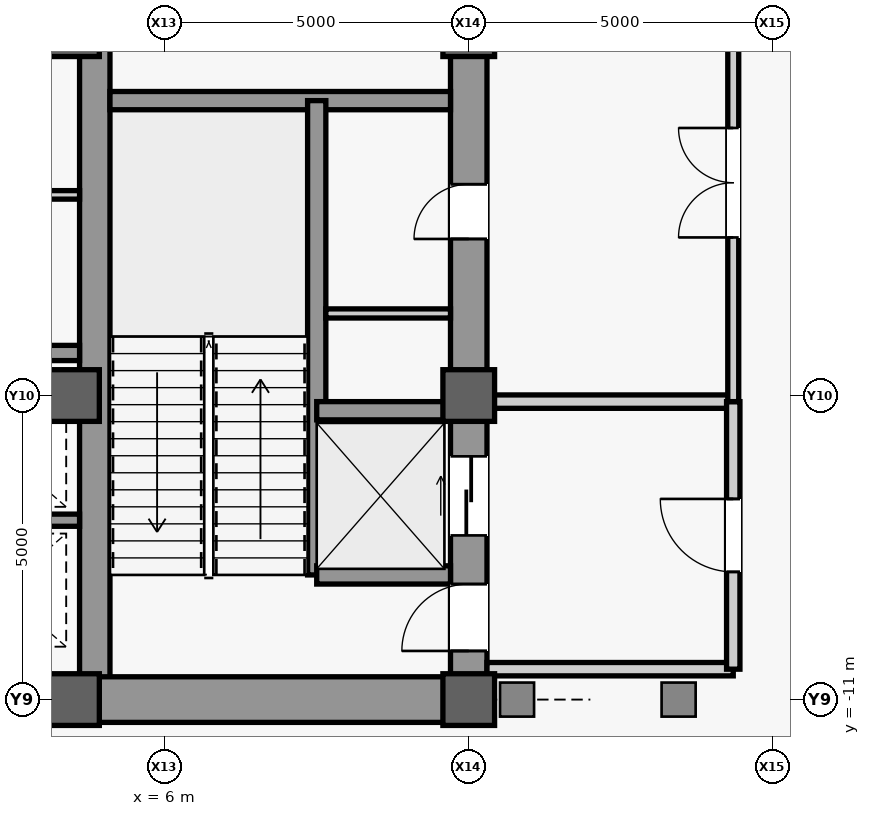
"""IFC4 building model, lengths in metres.
Left out: names, types, materials, properties, quantities, classifications, styles, units other than length and angle.
Written with IfcOpenShell. Run it as: python <this file> out.ifc"""

import sys

from ifc_helpers import new_model, si_unit, direction, frame, frame_2d, origin, origin_2d, place, context, subcontext, project, spatial, rectangle, extrude, source, transform, mapped, element, fill, save


model = new_model("IFC4")
c1 = context("Model", 3, precision=1e-05, world=origin(), true_north=direction((0.0, 1.0)))
c2 = subcontext(c1, "Body", "Model", "MODEL_VIEW")
j1 = project(units=[si_unit("LENGTHUNIT", "METRE"), si_unit("PLANEANGLEUNIT", "RADIAN")], contexts=[c1])
p1 = place(None, origin())
s1 = spatial("IfcSite", under=j1, at=p1, CompositionType="ELEMENT")
p2 = place(p1, origin())
s2 = spatial("IfcBuilding", under=s1, at=p2, CompositionType="ELEMENT")
p3 = place(p2, frame((0.0, 0.0, 149.9)))
s3 = spatial("IfcBuildingStorey", under=s2, at=p3, CompositionType="ELEMENT", Elevation=149.9)
m1 = source(origin(), c2, "Body", "SweptSolid", [
    extrude(rectangle(XDim=22.0, YDim=0.6, at=frame_2d((11.0, 0.0))), origin(), (0.0, 0.0, 1.0), 4.98),
])
p4 = place(p3, frame((11.0, -11.0, 0.0), z_axis=(0.0, 0.0, 1.0), x_axis=(0.0, 1.0, 0.0)))
e1 = element("IfcWall", 1, at=p4, inside=s3, PredefinedType="SHEAR", context=c2, shape_type="MappedRepresentation", body=[
    mapped(m1, transform((0.0, 0.0, 0.0), scale=1.0)),
])
m2 = source(origin(), c2, "Body", "SweptSolid", [
    extrude(rectangle(XDim=1.1, YDim=2.2, at=frame_2d((0.55, 1.1))), frame((0.0, 0.31, 0.0), z_axis=(0.0, -1.0, 0.0), x_axis=(1.0, 0.0, 0.0)), (0.0, 0.0, 1.0), 0.62),
])
p5 = place(p4, frame((0.8, 0.0, 0.0)))
e2 = element("IfcOpeningElement", 2, at=p5, cuts=e1, PredefinedType="OPENING", context=c2, shape_type="MappedRepresentation", body=[
    mapped(m2, transform((0.0, 0.0, 0.0), scale=1.0)),
])
m3 = source(origin(), c2, "Body", "SweptSolid", [
    extrude(rectangle(XDim=0.9, YDim=2.15, at=frame_2d((0.45, 1.075))), frame((0.0, 0.31, 0.0), z_axis=(0.0, -1.0, 0.0), x_axis=(1.0, 0.0, 0.0)), (0.0, 0.0, 1.0), 0.62),
])
p6 = place(p4, frame((7.575, 0.0, 0.0)))
e3 = element("IfcOpeningElement", 3, at=p6, cuts=e1, PredefinedType="OPENING", context=c2, shape_type="MappedRepresentation", body=[
    mapped(m3, transform((0.0, 0.0, 0.0), scale=1.0)),
])
m4 = source(origin(), c2, "Body", "SweptSolid", [
    extrude(rectangle(XDim=1.3, YDim=2.3, at=frame_2d((0.65, 1.15))), frame((0.0, 0.31, 0.0), z_axis=(0.0, -1.0, 0.0), x_axis=(1.0, 0.0, 0.0)), (0.0, 0.0, 1.0), 0.62),
])
p7 = place(p4, frame((2.7, 0.0, 0.0)))
e4 = element("IfcOpeningElement", 4, at=p7, cuts=e1, PredefinedType="OPENING", context=c2, shape_type="MappedRepresentation", body=[
    mapped(m4, transform((0.0, 0.0, 0.0), scale=1.0)),
])
p8 = place(p4, frame((13.35, 0.0, 0.0)))
e5 = element("IfcOpeningElement", 5, at=p8, cuts=e1, PredefinedType="OPENING", context=c2, shape_type="MappedRepresentation", body=[
    mapped(m4, transform((0.0, 0.0, 0.0), scale=1.0)),
])
m5 = source(origin(), c2, "Body", "SweptSolid", [
    extrude(rectangle(XDim=21.4, YDim=0.5, at=frame_2d((10.7, 0.0))), origin(), (0.0, 0.0, 1.0), 4.98),
])
p9 = place(p3, frame((4.85, -10.7, 0.0), z_axis=(0.0, 0.0, 1.0), x_axis=(0.0, 1.0, 0.0)))
e6 = element("IfcWall", 6, at=p9, inside=s3, PredefinedType="SHEAR", context=c2, shape_type="MappedRepresentation", body=[
    mapped(m5, transform((0.0, 0.0, 0.0), scale=1.0)),
])
m6 = source(origin(), c2, "Body", "SweptSolid", [
    extrude(rectangle(XDim=5.85, YDim=0.75, at=frame_2d((2.925, 0.0))), origin(), (0.0, 0.0, 1.0), 4.98),
])
p10 = place(p3, frame((4.85, -11.0, 0.0), z_axis=(0.0, 0.0, 1.0), x_axis=(1.0, 0.0, 0.0)))
e7 = element("IfcWall", 7, at=p10, inside=s3, PredefinedType="SHEAR", context=c2, shape_type="MappedRepresentation", body=[
    mapped(m6, transform((0.0, 0.0, 0.0), scale=1.0)),
])
m7 = source(origin(), c2, "Body", "SweptSolid", [
    extrude(rectangle(XDim=5.6, YDim=0.3, at=frame_2d((2.8, 0.0))), origin(), (0.0, 0.0, 1.0), 4.98),
])
p11 = place(p3, frame((5.1, -1.15, 0.0), z_axis=(0.0, 0.0, 1.0), x_axis=(1.0, 0.0, 0.0)))
e8 = element("IfcWall", 8, at=p11, inside=s3, PredefinedType="SHEAR", context=c2, shape_type="MappedRepresentation", body=[
    mapped(m7, transform((0.0, 0.0, 0.0), scale=1.0)),
])
m8 = source(origin(), c2, "Body", "SweptSolid", [
    extrude(rectangle(XDim=9.2, YDim=0.5, at=frame_2d((4.6, 0.0))), origin(), (0.0, 0.0, 1.0), 4.98),
])
p12 = place(p3, frame((-4.6, -11.0, 0.0), z_axis=(0.0, 0.0, 1.0), x_axis=(1.0, 0.0, 0.0)))
e9 = element("IfcWall", 9, at=p12, inside=s3, PredefinedType="SHEAR", context=c2, shape_type="MappedRepresentation", body=[
    mapped(m8, transform((0.0, 0.0, 0.0), scale=1.0)),
])
m9 = source(origin(), c2, "Body", "SweptSolid", [
    extrude(rectangle(XDim=1.8, YDim=2.25, at=frame_2d((0.9, 1.125))), frame((0.0, 0.26, 0.0), z_axis=(0.0, -1.0, 0.0), x_axis=(1.0, 0.0, 0.0)), (0.0, 0.0, 1.0), 0.52),
])
p13 = place(p12, frame((3.7, 0.0, 0.0)))
e10 = element("IfcOpeningElement", 10, at=p13, cuts=e9, PredefinedType="OPENING", context=c2, shape_type="MappedRepresentation", body=[
    mapped(m9, transform((0.0, 0.0, 0.0), scale=1.0)),
])
m10 = source(origin(), c2, "Body", "SweptSolid", [
    extrude(rectangle(XDim=0.85, YDim=0.85, at=origin_2d()), origin(), (0.0, 0.0, 1.0), 5.2),
])
for number, where, z_axis, x_axis in (
    (11, (4.5, -11.0, 0.0), (0.0, 0.0, 1.0), (1.0, 0.0, 0.0)),
    (12, (4.5, -6.0, 0.0), (0.0, 0.0, 1.0), (1.0, 0.0, 0.0)),
    (13, (4.5, 0.0, 0.0), (0.0, 0.0, 1.0), (1.0, 0.0, 0.0)),
    (14, (11.0, -11.0, 0.0), (0.0, 0.0, 1.0), (1.0, 0.0, 0.0)),
    (15, (11.0, -6.0, 0.0), (0.0, 0.0, 1.0), (1.0, 0.0, 0.0)),
    (16, (11.0, 0.0, 0.0), (0.0, 0.0, 1.0), (1.0, 0.0, 0.0)),
):
    element("IfcColumn", number, at=place(p3, frame(where, z_axis=z_axis, x_axis=x_axis)), inside=s3, PredefinedType="COLUMN", context=c2, shape_type="MappedRepresentation", body=[
        mapped(m10, transform((0.0, 0.0, 0.0), scale=1.0)),
    ])
m11 = source(origin(), c2, "Body", "SweptSolid", [
    extrude(rectangle(XDim=7.8, YDim=0.3, at=frame_2d((3.9, 0.0))), origin(), (0.0, 0.0, 1.0), 4.98),
])
p14 = place(p3, frame((8.5, -8.95, 0.0), z_axis=(0.0, 0.0, 1.0), x_axis=(0.0, 1.0, 0.0)))
e17 = element("IfcWall", 17, at=p14, inside=s3, PredefinedType="SHEAR", context=c2, shape_type="MappedRepresentation", body=[
    mapped(m11, transform((0.0, 0.0, 0.0), scale=1.0)),
])
m12 = source(origin(), c2, "Body", "SweptSolid", [
    extrude(rectangle(XDim=2.2, YDim=0.3, at=frame_2d((1.1, 0.0))), origin(), (0.0, 0.0, 1.0), 4.98),
])
for number, where, z_axis, x_axis in (
    (18, (8.5, -8.95, 0.0), (0.0, 0.0, 1.0), (1.0, 0.0, 0.0)),
    (19, (8.5, -6.25, 0.0), (0.0, 0.0, 1.0), (1.0, 0.0, 0.0)),
):
    element("IfcWall", number, at=place(p3, frame(where, z_axis=z_axis, x_axis=x_axis)), inside=s3, PredefinedType="SHEAR", context=c2, shape_type="MappedRepresentation", body=[
        mapped(m12, transform((0.0, 0.0, 0.0), scale=1.0)),
    ])
m13 = source(origin(), c2, "Body", "SweptSolid", [
    extrude(rectangle(XDim=2.05, YDim=0.15, at=frame_2d((1.025, 0.0))), origin(), (0.0, 0.0, 1.0), 4.98),
])
p15 = place(p3, frame((8.65, -4.65, 0.0), z_axis=(0.0, 0.0, 1.0), x_axis=(1.0, 0.0, 0.0)))
e20 = element("IfcWall", 20, at=p15, inside=s3, PredefinedType="PARTITIONING", context=c2, shape_type="MappedRepresentation", body=[
    mapped(m13, transform((0.0, 0.0, 0.0), scale=1.0)),
])
m14 = source(origin(), c2, "Body", "SweptSolid", [
    extrude(rectangle(XDim=4.05, YDim=0.22, at=frame_2d((2.025, 0.0))), origin(), (0.0, 0.0, 1.0), 4.98),
])
p16 = place(p3, frame((11.3, -10.5, 0.0), z_axis=(0.0, 0.0, 1.0), x_axis=(1.0, 0.0, 0.0)))
e21 = element("IfcWall", 21, at=p16, inside=s3, PredefinedType="PARTITIONING", context=c2, shape_type="MappedRepresentation", body=[
    mapped(m14, transform((0.0, 0.0, 0.0), scale=1.0)),
])
m15 = source(origin(), c2, "Body", "SweptSolid", [
    extrude(rectangle(XDim=4.05, YDim=0.22, at=frame_2d((2.025, 0.0))), origin(), (0.0, 0.0, 1.0), 4.207),
])
p17 = place(p3, frame((11.3, -6.1, 0.0), z_axis=(0.0, 0.0, 1.0), x_axis=(1.0, 0.0, 0.0)))
e22 = element("IfcWall", 22, at=p17, inside=s3, PredefinedType="PARTITIONING", context=c2, shape_type="MappedRepresentation", body=[
    mapped(m15, transform((0.0, 0.0, 0.0), scale=1.0)),
])
m16 = source(origin(), c2, "Body", "SweptSolid", [
    extrude(rectangle(XDim=4.4, YDim=0.22, at=frame_2d((2.2, 0.0))), origin(), (0.0, 0.0, 1.0), 4.98),
])
p18 = place(p3, frame((15.35, -10.5, 0.0), z_axis=(0.0, 0.0, 1.0), x_axis=(0.0, 1.0, 0.0)))
e23 = element("IfcWall", 23, at=p18, inside=s3, PredefinedType="PARTITIONING", context=c2, shape_type="MappedRepresentation", body=[
    mapped(m16, transform((0.0, 0.0, 0.0), scale=1.0)),
])
m17 = source(origin(), c2, "Body", "SweptSolid", [
    extrude(rectangle(XDim=1.2, YDim=2.2, at=frame_2d((0.6, 1.1))), frame((0.0, 0.12, 0.0), z_axis=(0.0, -1.0, 0.0), x_axis=(1.0, 0.0, 0.0)), (0.0, 0.0, 1.0), 0.24),
])
p19 = place(p18, frame((1.6, 0.0, 0.0)))
e24 = element("IfcOpeningElement", 24, at=p19, cuts=e23, PredefinedType="OPENING", context=c2, shape_type="MappedRepresentation", body=[
    mapped(m17, transform((0.0, 0.0, 0.0), scale=1.0)),
])
m18 = source(origin(), c2, "Body", "SweptSolid", [
    extrude(rectangle(XDim=16.6, YDim=0.18, at=frame_2d((8.3, 0.0))), origin(), (0.0, 0.0, 1.0), 4.98),
])
p20 = place(p3, frame((15.35, -6.1, 0.0), z_axis=(0.0, 0.0, 1.0), x_axis=(0.0, 1.0, 0.0)))
e25 = element("IfcWall", 25, at=p20, inside=s3, PredefinedType="PARTITIONING", context=c2, shape_type="MappedRepresentation", body=[
    mapped(m18, transform((0.0, 0.0, 0.0), scale=1.0)),
])
m19 = source(origin(), c2, "Body", "SweptSolid", [
    extrude(rectangle(XDim=1.8, YDim=2.25, at=frame_2d((0.9, 1.125))), frame((0.0, 0.1, 0.0), z_axis=(0.0, -1.0, 0.0), x_axis=(1.0, 0.0, 0.0)), (0.0, 0.0, 1.0), 0.2),
])
p21 = place(p20, frame((2.7, 0.0, 0.0)))
e26 = element("IfcOpeningElement", 26, at=p21, cuts=e25, PredefinedType="OPENING", context=c2, shape_type="MappedRepresentation", body=[
    mapped(m19, transform((0.0, 0.0, 0.0), scale=1.0)),
])
p22 = place(p20, frame((13.0, 0.0, 0.0)))
e27 = element("IfcOpeningElement", 27, at=p22, cuts=e25, PredefinedType="OPENING", context=c2, shape_type="MappedRepresentation", body=[
    mapped(m19, transform((0.0, 0.0, 0.0), scale=1.0)),
])
m20 = source(origin(), c2, "Body", "SweptSolid", [
    extrude(rectangle(XDim=2.45, YDim=0.2, at=frame_2d((1.225, 0.0))), origin(), (0.0, 0.0, 1.0), 4.98),
])
p23 = place(p3, frame((2.15, -8.05, 0.0), z_axis=(0.0, 0.0, 1.0), x_axis=(1.0, 0.0, 0.0)))
e28 = element("IfcWall", 28, at=p23, inside=s3, PredefinedType="SHEAR", context=c2, shape_type="MappedRepresentation", body=[
    mapped(m20, transform((0.0, 0.0, 0.0), scale=1.0)),
])
m21 = source(origin(), c2, "Body", "SweptSolid", [
    extrude(rectangle(XDim=9.2, YDim=0.25, at=frame_2d((4.6, 0.0))), origin(), (0.0, 0.0, 1.0), 4.98),
])
p24 = place(p3, frame((-4.6, -5.3, 0.0), z_axis=(0.0, 0.0, 1.0), x_axis=(1.0, 0.0, 0.0)))
e29 = element("IfcWall", 29, at=p24, inside=s3, PredefinedType="SHEAR", context=c2, shape_type="MappedRepresentation", body=[
    mapped(m21, transform((0.0, 0.0, 0.0), scale=1.0)),
])
m22 = source(origin(), c2, "Body", "SweptSolid", [
    extrude(rectangle(XDim=1.05, YDim=2.2, at=frame_2d((0.525, 1.1))), frame((0.0, 0.135, 0.0), z_axis=(0.0, -1.0, 0.0), x_axis=(1.0, 0.0, 0.0)), (0.0, 0.0, 1.0), 0.27),
])
p25 = place(p24, frame((4.075, 0.0, 0.0)))
e30 = element("IfcOpeningElement", 30, at=p25, cuts=e29, PredefinedType="OPENING", context=c2, shape_type="MappedRepresentation", body=[
    mapped(m22, transform((0.0, 0.0, 0.0), scale=1.0)),
])
m23 = source(origin(), c2, "Body", "SweptSolid", [
    extrude(rectangle(XDim=3.45, YDim=0.14, at=frame_2d((1.725, 0.0))), origin(), (0.0, 0.0, 1.0), 4.98),
])
p26 = place(p3, frame((1.15, -2.7, 0.0), z_axis=(0.0, 0.0, 1.0), x_axis=(1.0, 0.0, 0.0)))
e31 = element("IfcWall", 31, at=p26, inside=s3, PredefinedType="PARTITIONING", context=c2, shape_type="MappedRepresentation", body=[
    mapped(m23, transform((0.0, 0.0, 0.0), scale=1.0)),
])
m24 = source(origin(), c2, "Body", "SweptSolid", [
    extrude(rectangle(XDim=1.1, YDim=2.2, at=frame_2d((0.55, 1.1))), frame((0.0, 0.025, 0.0), z_axis=(0.0, -1.0, 0.0), x_axis=(1.0, 0.0, 0.0)), (0.0, 0.0, 1.0), 0.05),
])
p27 = place(p5, origin())
e32 = element("IfcDoor", 32, at=p27, inside=s3, OperationType="SINGLE_SWING_LEFT", PredefinedType="DOOR", context=c2, shape_type="MappedRepresentation", body=[
    mapped(m24, transform((0.0, 0.0, 0.0), scale=1.0)),
])
fill(e2, e32)
m25 = source(origin(), c2, "Body", "SweptSolid", [
    extrude(rectangle(XDim=0.9, YDim=2.15, at=frame_2d((0.45, 1.075))), frame((0.0, 0.025, 0.0), z_axis=(0.0, -1.0, 0.0), x_axis=(1.0, 0.0, 0.0)), (0.0, 0.0, 1.0), 0.05),
])
p28 = place(p6, origin())
e33 = element("IfcDoor", 33, at=p28, inside=s3, OperationType="SINGLE_SWING_LEFT", PredefinedType="DOOR", context=c2, shape_type="MappedRepresentation", body=[
    mapped(m25, transform((0.0, 0.0, 0.0), scale=1.0)),
])
fill(e3, e33)
m26 = source(origin(), c2, "Body", "SweptSolid", [
    extrude(rectangle(XDim=1.2, YDim=2.2, at=frame_2d((0.6, 1.1))), frame((0.0, 0.025, 0.0), z_axis=(0.0, -1.0, 0.0), x_axis=(1.0, 0.0, 0.0)), (0.0, 0.0, 1.0), 0.05),
])
p29 = place(p19, origin())
e34 = element("IfcDoor", 34, at=p29, inside=s3, OperationType="SINGLE_SWING_RIGHT", PredefinedType="DOOR", context=c2, shape_type="MappedRepresentation", body=[
    mapped(m26, transform((0.0, 0.0, 0.0), scale=1.0)),
])
fill(e24, e34)
m27 = source(origin(), c2, "Body", "SweptSolid", [
    extrude(rectangle(XDim=1.8, YDim=2.25, at=frame_2d((0.9, 1.125))), frame((0.0, 0.025, 0.0), z_axis=(0.0, -1.0, 0.0), x_axis=(1.0, 0.0, 0.0)), (0.0, 0.0, 1.0), 0.05),
])
p30 = place(p21, origin())
e35 = element("IfcDoor", 35, at=p30, inside=s3, OperationType="SINGLE_SWING_RIGHT", PredefinedType="DOOR", context=c2, shape_type="MappedRepresentation", body=[
    mapped(m27, transform((0.0, 0.0, 0.0), scale=1.0)),
])
fill(e26, e35)
m28 = source(origin(), c2, "Body", "SweptSolid", [
    extrude(rectangle(XDim=1.3, YDim=2.3, at=frame_2d((0.65, 1.15))), frame((0.0, 0.025, 0.0), z_axis=(0.0, -1.0, 0.0), x_axis=(1.0, 0.0, 0.0)), (0.0, 0.0, 1.0), 0.05),
])
p31 = place(p7, origin())
e36 = element("IfcDoor", 36, at=p31, inside=s3, OperationType="SLIDING_TO_LEFT", PredefinedType="DOOR", context=c2, shape_type="MappedRepresentation", body=[
    mapped(m28, transform((0.0, 0.0, 0.0), scale=1.0)),
])
fill(e4, e36)
save(model, sys.argv[1])
